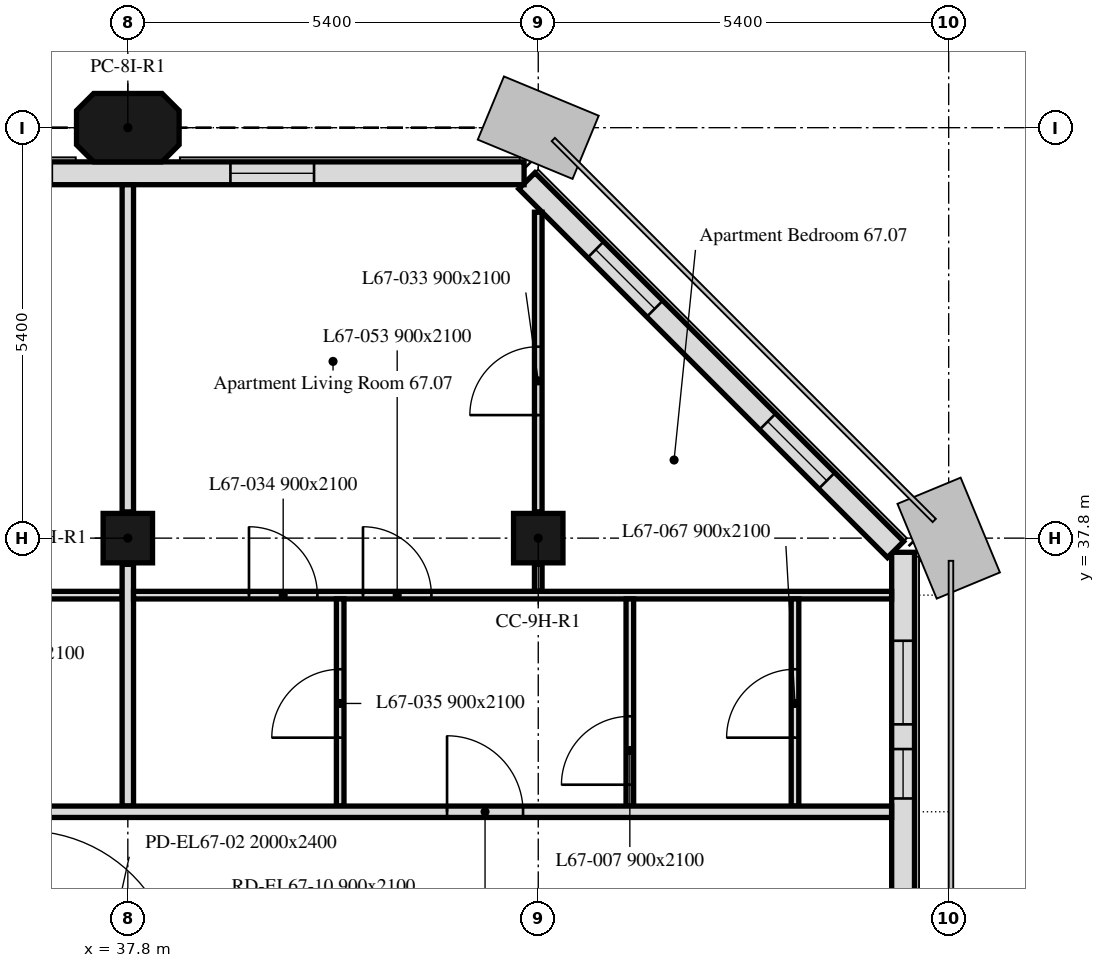
"""IFC4 building model, lengths in metres.
Left out: names, types, materials, properties, quantities, classifications, styles, units other than length and angle.
Written with IfcOpenShell. Run it as: python <this file> out.ifc"""

import sys

from ifc_helpers import new_model, si_unit, direction, frame, frame_2d, origin, origin_2d, place, context, subcontext, project, spatial, polyline, rectangle, outline, extrude, element, fill, save


model = new_model("IFC4")
c1 = context("Model", 3, precision=1e-05, world=origin(), true_north=direction((0.0, 1.0)))
c2 = subcontext(c1, "Body", "Model", "MODEL_VIEW")
j1 = project(units=[si_unit("LENGTHUNIT", "METRE"), si_unit("PLANEANGLEUNIT", "RADIAN")], contexts=[c1])
p1 = place(None, origin())
s1 = spatial("IfcSite", under=j1, at=p1, CompositionType="ELEMENT")
p2 = place(p1, origin())
s2 = spatial("IfcBuilding", under=s1, at=p2, CompositionType="ELEMENT")
p3 = place(p2, frame((0.0, 0.0, 275.2)))
s3 = spatial("IfcBuildingStorey", under=s2, at=p3, CompositionType="ELEMENT", Elevation=275.2)
for number, where, z_axis, x_axis in (
    (1, (37.8, 37.8, 0.0), (0.0, 0.0, 1.0), (1.0, 0.0, 0.0)),
    (2, (43.2, 37.8, 0.0), (0.0, 0.0, 1.0), (1.0, 0.0, 0.0)),
):
    element("IfcColumn", number, at=place(p3, frame(where, z_axis=z_axis, x_axis=x_axis)), inside=s3, PredefinedType="COLUMN", context=c2, shape_type="SweptSolid", body=[
        extrude(rectangle(XDim=0.65, YDim=0.65, at=origin_2d()), origin(), (0.0, 0.0, 1.0), 3.0),
    ])
p4 = place(p3, frame((37.8, 43.2, 0.0), z_axis=(0.0, 0.0, 1.0), x_axis=(1.0, 0.0, 0.0)))
e3 = element("IfcColumn", 3, at=p4, inside=s3, PredefinedType="COLUMN", context=c2, shape_type="SweptSolid", body=[
    extrude(outline(polyline([(-0.45, -0.45), (0.45, -0.45), (0.675, -0.225), (0.675, 0.225), (0.45, 0.45), (-0.45, 0.45), (-0.675, 0.225), (-0.675, -0.225), (-0.45, -0.45)])), origin(), (0.0, 0.0, 1.0), 3.0),
])
p5 = place(p3, frame((48.0, 5.586, 0.0), z_axis=(0.0, 0.0, 1.0), x_axis=(0.0, 1.0, 0.0)))
e4 = element("IfcWall", 4, at=p5, inside=s3, PredefinedType="SOLIDWALL", context=c2, shape_type="SweptSolid", body=[
    extrude(rectangle(XDim=32.027, YDim=0.3, at=frame_2d((16.014, 0.0))), origin(), (0.0, 0.0, 1.0), 3.0),
])
p6 = place(p5, frame((1.789, 0.0, 0.9)))
e5 = element("IfcOpeningElement", 5, at=p6, cuts=e4, PredefinedType="OPENING", context=c2, shape_type="SweptSolid", body=[
    extrude(rectangle(XDim=0.65, YDim=1.7, at=frame_2d((0.325, 0.85))), frame((0.0, 0.16, 0.0), z_axis=(0.0, -1.0, 0.0), x_axis=(1.0, 0.0, 0.0)), (0.0, 0.0, 1.0), 0.32),
])
p7 = place(p5, frame((2.764, 0.0, 0.9)))
e6 = element("IfcOpeningElement", 6, at=p7, cuts=e4, PredefinedType="OPENING", context=c2, shape_type="SweptSolid", body=[
    extrude(rectangle(XDim=1.1, YDim=1.7, at=frame_2d((0.55, 0.85))), frame((0.0, 0.16, 0.0), z_axis=(0.0, -1.0, 0.0), x_axis=(1.0, 0.0, 0.0)), (0.0, 0.0, 1.0), 0.32),
])
p8 = place(p5, frame((6.564, 0.0, 0.9)))
e7 = element("IfcOpeningElement", 7, at=p8, cuts=e4, PredefinedType="OPENING", context=c2, shape_type="SweptSolid", body=[
    extrude(rectangle(XDim=1.1, YDim=1.7, at=frame_2d((0.55, 0.85))), frame((0.0, 0.16, 0.0), z_axis=(0.0, -1.0, 0.0), x_axis=(1.0, 0.0, 0.0)), (0.0, 0.0, 1.0), 0.32),
])
p9 = place(p5, frame((7.989, 0.0, 0.9)))
e8 = element("IfcOpeningElement", 8, at=p9, cuts=e4, PredefinedType="OPENING", context=c2, shape_type="SweptSolid", body=[
    extrude(rectangle(XDim=0.65, YDim=1.7, at=frame_2d((0.325, 0.85))), frame((0.0, 0.16, 0.0), z_axis=(0.0, -1.0, 0.0), x_axis=(1.0, 0.0, 0.0)), (0.0, 0.0, 1.0), 0.32),
])
p10 = place(p5, frame((11.964, 0.0, 0.9)))
e9 = element("IfcOpeningElement", 9, at=p10, cuts=e4, PredefinedType="OPENING", context=c2, shape_type="SweptSolid", body=[
    extrude(rectangle(XDim=1.1, YDim=1.7, at=frame_2d((0.55, 0.85))), frame((0.0, 0.16, 0.0), z_axis=(0.0, -1.0, 0.0), x_axis=(1.0, 0.0, 0.0)), (0.0, 0.0, 1.0), 0.32),
])
p11 = place(p5, frame((13.564, 0.0, 0.9)))
e10 = element("IfcOpeningElement", 10, at=p11, cuts=e4, PredefinedType="OPENING", context=c2, shape_type="SweptSolid", body=[
    extrude(rectangle(XDim=1.1, YDim=1.7, at=frame_2d((0.55, 0.85))), frame((0.0, 0.16, 0.0), z_axis=(0.0, -1.0, 0.0), x_axis=(1.0, 0.0, 0.0)), (0.0, 0.0, 1.0), 0.32),
])
p12 = place(p5, frame((17.014, 0.0, 0.9)))
e11 = element("IfcOpeningElement", 11, at=p12, cuts=e4, PredefinedType="OPENING", context=c2, shape_type="SweptSolid", body=[
    extrude(rectangle(XDim=3.4, YDim=1.7, at=frame_2d((1.7, 0.85))), frame((0.0, 0.16, 0.0), z_axis=(0.0, -1.0, 0.0), x_axis=(1.0, 0.0, 0.0)), (0.0, 0.0, 1.0), 0.32),
])
p13 = place(p5, frame((22.764, 0.0, 0.9)))
e12 = element("IfcOpeningElement", 12, at=p13, cuts=e4, PredefinedType="OPENING", context=c2, shape_type="SweptSolid", body=[
    extrude(rectangle(XDim=1.1, YDim=1.7, at=frame_2d((0.55, 0.85))), frame((0.0, 0.16, 0.0), z_axis=(0.0, -1.0, 0.0), x_axis=(1.0, 0.0, 0.0)), (0.0, 0.0, 1.0), 0.32),
])
p14 = place(p5, frame((24.364, 0.0, 0.9)))
e13 = element("IfcOpeningElement", 13, at=p14, cuts=e4, PredefinedType="OPENING", context=c2, shape_type="SweptSolid", body=[
    extrude(rectangle(XDim=1.1, YDim=1.7, at=frame_2d((0.55, 0.85))), frame((0.0, 0.16, 0.0), z_axis=(0.0, -1.0, 0.0), x_axis=(1.0, 0.0, 0.0)), (0.0, 0.0, 1.0), 0.32),
])
p15 = place(p5, frame((28.789, 0.0, 0.9)))
e14 = element("IfcOpeningElement", 14, at=p15, cuts=e4, PredefinedType="OPENING", context=c2, shape_type="SweptSolid", body=[
    extrude(rectangle(XDim=0.65, YDim=1.7, at=frame_2d((0.325, 0.85))), frame((0.0, 0.16, 0.0), z_axis=(0.0, -1.0, 0.0), x_axis=(1.0, 0.0, 0.0)), (0.0, 0.0, 1.0), 0.32),
])
p16 = place(p5, frame((29.764, 0.0, 0.9)))
e15 = element("IfcOpeningElement", 15, at=p16, cuts=e4, PredefinedType="OPENING", context=c2, shape_type="SweptSolid", body=[
    extrude(rectangle(XDim=1.1, YDim=1.7, at=frame_2d((0.55, 0.85))), frame((0.0, 0.16, 0.0), z_axis=(0.0, -1.0, 0.0), x_axis=(1.0, 0.0, 0.0)), (0.0, 0.0, 1.0), 0.32),
])
p17 = place(p3, frame((47.901, 37.65, 0.0), z_axis=(0.0, 0.0, 1.0), x_axis=(-0.707106781187, 0.707106781187, 0.0)))
e16 = element("IfcWall", 16, at=p17, inside=s3, PredefinedType="SOLIDWALL", context=c2, shape_type="SweptSolid", body=[
    extrude(rectangle(XDim=6.86, YDim=0.3, at=frame_2d((3.43, 0.0))), origin(), (0.0, 0.0, 1.0), 3.0),
])
p18 = place(p17, frame((1.28, 0.0, 0.9)))
e17 = element("IfcOpeningElement", 17, at=p18, cuts=e16, PredefinedType="OPENING", context=c2, shape_type="SweptSolid", body=[
    extrude(rectangle(XDim=1.1, YDim=1.7, at=frame_2d((0.55, 0.85))), frame((0.0, 0.16, 0.0), z_axis=(0.0, -1.0, 0.0), x_axis=(1.0, 0.0, 0.0)), (0.0, 0.0, 1.0), 0.32),
])
p19 = place(p17, frame((4.48, 0.0, 0.9)))
e18 = element("IfcOpeningElement", 18, at=p19, cuts=e16, PredefinedType="OPENING", context=c2, shape_type="SweptSolid", body=[
    extrude(rectangle(XDim=1.1, YDim=1.7, at=frame_2d((0.55, 0.85))), frame((0.0, 0.16, 0.0), z_axis=(0.0, -1.0, 0.0), x_axis=(1.0, 0.0, 0.0)), (0.0, 0.0, 1.0), 0.32),
])
p20 = place(p3, frame((43.014, 42.6, 0.0), z_axis=(0.0, 0.0, 1.0), x_axis=(-1.0, 0.0, 0.0)))
e19 = element("IfcWall", 19, at=p20, inside=s3, PredefinedType="SOLIDWALL", context=c2, shape_type="SweptSolid", body=[
    extrude(rectangle(XDim=32.027, YDim=0.3, at=frame_2d((16.014, 0.0))), origin(), (0.0, 0.0, 1.0), 3.0),
])
p21 = place(p20, frame((2.764, 0.0, 0.9)))
e20 = element("IfcOpeningElement", 20, at=p21, cuts=e19, PredefinedType="OPENING", context=c2, shape_type="SweptSolid", body=[
    extrude(rectangle(XDim=1.1, YDim=1.7, at=frame_2d((0.55, 0.85))), frame((0.0, 0.16, 0.0), z_axis=(0.0, -1.0, 0.0), x_axis=(1.0, 0.0, 0.0)), (0.0, 0.0, 1.0), 0.32),
])
p22 = place(p20, frame((6.214, 0.0, 0.9)))
e21 = element("IfcOpeningElement", 21, at=p22, cuts=e19, PredefinedType="OPENING", context=c2, shape_type="SweptSolid", body=[
    extrude(rectangle(XDim=3.4, YDim=1.7, at=frame_2d((1.7, 0.85))), frame((0.0, 0.16, 0.0), z_axis=(0.0, -1.0, 0.0), x_axis=(1.0, 0.0, 0.0)), (0.0, 0.0, 1.0), 0.32),
])
p23 = place(p20, frame((13.564, 0.0, 0.9)))
e22 = element("IfcOpeningElement", 22, at=p23, cuts=e19, PredefinedType="OPENING", context=c2, shape_type="SweptSolid", body=[
    extrude(rectangle(XDim=1.1, YDim=1.7, at=frame_2d((0.55, 0.85))), frame((0.0, 0.16, 0.0), z_axis=(0.0, -1.0, 0.0), x_axis=(1.0, 0.0, 0.0)), (0.0, 0.0, 1.0), 0.32),
])
p24 = place(p20, frame((17.014, 0.0, 0.9)))
e23 = element("IfcOpeningElement", 23, at=p24, cuts=e19, PredefinedType="OPENING", context=c2, shape_type="SweptSolid", body=[
    extrude(rectangle(XDim=3.4, YDim=1.7, at=frame_2d((1.7, 0.85))), frame((0.0, 0.16, 0.0), z_axis=(0.0, -1.0, 0.0), x_axis=(1.0, 0.0, 0.0)), (0.0, 0.0, 1.0), 0.32),
])
p25 = place(p20, frame((24.364, 0.0, 0.9)))
e24 = element("IfcOpeningElement", 24, at=p25, cuts=e19, PredefinedType="OPENING", context=c2, shape_type="SweptSolid", body=[
    extrude(rectangle(XDim=1.1, YDim=1.7, at=frame_2d((0.55, 0.85))), frame((0.0, 0.16, 0.0), z_axis=(0.0, -1.0, 0.0), x_axis=(1.0, 0.0, 0.0)), (0.0, 0.0, 1.0), 0.32),
])
p26 = place(p20, frame((27.814, 0.0, 0.9)))
e25 = element("IfcOpeningElement", 25, at=p26, cuts=e19, PredefinedType="OPENING", context=c2, shape_type="SweptSolid", body=[
    extrude(rectangle(XDim=3.4, YDim=1.7, at=frame_2d((1.7, 0.85))), frame((0.0, 0.16, 0.0), z_axis=(0.0, -1.0, 0.0), x_axis=(1.0, 0.0, 0.0)), (0.0, 0.0, 1.0), 0.32),
])
p27 = place(p3, frame((27.075, 37.05, 0.0), z_axis=(0.0, 0.0, 1.0), x_axis=(1.0, 0.0, 0.0)))
e26 = element("IfcWall", 26, at=p27, inside=s3, PredefinedType="PARTITIONING", context=c2, shape_type="SweptSolid", body=[
    extrude(rectangle(XDim=10.65, YDim=0.1, at=frame_2d((5.325, 0.0))), origin(), (0.0, 0.0, 1.0), 3.0),
])
p28 = place(p27, frame((7.946, 0.0, 0.0)))
e27 = element("IfcOpeningElement", 27, at=p28, cuts=e26, PredefinedType="OPENING", context=c2, shape_type="SweptSolid", body=[
    extrude(rectangle(XDim=0.9, YDim=2.1, at=frame_2d((0.45, 1.05))), frame((0.0, 0.05, 0.0), z_axis=(0.0, -1.0, 0.0), x_axis=(1.0, 0.0, 0.0)), (0.0, 0.0, 1.0), 0.1),
])
p29 = place(p27, frame((1.46, 0.0, 0.0)))
e28 = element("IfcOpeningElement", 28, at=p29, cuts=e26, PredefinedType="OPENING", context=c2, shape_type="SweptSolid", body=[
    extrude(rectangle(XDim=0.9, YDim=2.1, at=frame_2d((0.45, 1.05))), frame((0.0, 0.05, 0.0), z_axis=(0.0, -1.0, 0.0), x_axis=(1.0, 0.0, 0.0)), (0.0, 0.0, 1.0), 0.1),
])
p30 = place(p27, frame((2.96, 0.0, 0.0)))
e29 = element("IfcOpeningElement", 29, at=p30, cuts=e26, PredefinedType="OPENING", context=c2, shape_type="SweptSolid", body=[
    extrude(rectangle(XDim=0.9, YDim=2.1, at=frame_2d((0.45, 1.05))), frame((0.0, 0.05, 0.0), z_axis=(0.0, -1.0, 0.0), x_axis=(1.0, 0.0, 0.0)), (0.0, 0.0, 1.0), 0.1),
])
p31 = place(p3, frame((37.8, 38.145, 0.0), z_axis=(0.0, 0.0, 1.0), x_axis=(0.0, 1.0, 0.0)))
e30 = element("IfcWall", 30, at=p31, inside=s3, PredefinedType="PARTITIONING", context=c2, shape_type="SweptSolid", body=[
    extrude(rectangle(XDim=4.304, YDim=0.15, at=frame_2d((2.152, 0.0))), origin(), (0.0, 0.0, 1.0), 3.0),
])
p32 = place(p3, frame((37.8, 34.275, 0.0), z_axis=(0.0, 0.0, 1.0), x_axis=(0.0, 1.0, 0.0)))
e31 = element("IfcWall", 31, at=p32, inside=s3, PredefinedType="PARTITIONING", context=c2, shape_type="SweptSolid", body=[
    extrude(rectangle(XDim=3.18, YDim=0.15, at=frame_2d((1.59, 0.0))), origin(), (0.0, 0.0, 1.0), 3.0),
])
p33 = place(p3, frame((43.2, 37.1, 0.0), z_axis=(0.0, 0.0, 1.0), x_axis=(0.0, 1.0, 0.0)))
e32 = element("IfcWall", 32, at=p33, inside=s3, PredefinedType="PARTITIONING", context=c2, shape_type="SweptSolid", body=[
    extrude(rectangle(XDim=0.355, YDim=0.1, at=frame_2d((0.177, 0.0))), origin(), (0.0, 0.0, 1.0), 3.0),
])
p34 = place(p3, frame((43.2, 38.145, 0.0), z_axis=(0.0, 0.0, 1.0), x_axis=(0.0, 1.0, 0.0)))
e33 = element("IfcWall", 33, at=p34, inside=s3, PredefinedType="PARTITIONING", context=c2, shape_type="SweptSolid", body=[
    extrude(rectangle(XDim=3.943, YDim=0.1, at=frame_2d((1.971, 0.0))), origin(), (0.0, 0.0, 1.0), 3.0),
])
p35 = place(p34, frame((1.274, 0.0, 0.0)))
e34 = element("IfcOpeningElement", 34, at=p35, cuts=e33, PredefinedType="OPENING", context=c2, shape_type="SweptSolid", body=[
    extrude(rectangle(XDim=0.9, YDim=2.1, at=frame_2d((0.45, 1.05))), frame((0.0, 0.05, 0.0), z_axis=(0.0, -1.0, 0.0), x_axis=(1.0, 0.0, 0.0)), (0.0, 0.0, 1.0), 0.1),
])
p36 = place(p3, frame((37.875, 37.05, 0.0), z_axis=(0.0, 0.0, 1.0), x_axis=(1.0, 0.0, 0.0)))
e35 = element("IfcWall", 35, at=p36, inside=s3, PredefinedType="PARTITIONING", context=c2, shape_type="SweptSolid", body=[
    extrude(rectangle(XDim=9.974, YDim=0.1, at=frame_2d((4.987, 0.0))), origin(), (0.0, 0.0, 1.0), 3.0),
])
p37 = place(p36, frame((1.519, 0.0, 0.0)))
e36 = element("IfcOpeningElement", 36, at=p37, cuts=e35, PredefinedType="OPENING", context=c2, shape_type="SweptSolid", body=[
    extrude(rectangle(XDim=0.9, YDim=2.1, at=frame_2d((0.45, 1.05))), frame((0.0, 0.05, 0.0), z_axis=(0.0, -1.0, 0.0), x_axis=(1.0, 0.0, 0.0)), (0.0, 0.0, 1.0), 0.1),
])
p38 = place(p36, frame((3.019, 0.0, 0.0)))
e37 = element("IfcOpeningElement", 37, at=p38, cuts=e35, PredefinedType="OPENING", context=c2, shape_type="SweptSolid", body=[
    extrude(rectangle(XDim=0.9, YDim=2.1, at=frame_2d((0.45, 1.05))), frame((0.0, 0.05, 0.0), z_axis=(0.0, -1.0, 0.0), x_axis=(1.0, 0.0, 0.0)), (0.0, 0.0, 1.0), 0.1),
])
p39 = place(p3, frame((40.594, 34.275, 0.0), z_axis=(0.0, 0.0, 1.0), x_axis=(0.0, 1.0, 0.0)))
e38 = element("IfcWall", 38, at=p39, inside=s3, PredefinedType="PARTITIONING", context=c2, shape_type="SweptSolid", body=[
    extrude(rectangle(XDim=2.725, YDim=0.1, at=frame_2d((1.363, 0.0))), origin(), (0.0, 0.0, 1.0), 3.0),
])
p40 = place(p39, frame((0.9, 0.0, 0.0)))
e39 = element("IfcOpeningElement", 39, at=p40, cuts=e38, PredefinedType="OPENING", context=c2, shape_type="SweptSolid", body=[
    extrude(rectangle(XDim=0.9, YDim=2.1, at=frame_2d((0.45, 1.05))), frame((0.0, 0.05, 0.0), z_axis=(0.0, -1.0, 0.0), x_axis=(1.0, 0.0, 0.0)), (0.0, 0.0, 1.0), 0.1),
])
p41 = place(p3, frame((44.405, 34.275, 0.0), z_axis=(0.0, 0.0, 1.0), x_axis=(0.0, 1.0, 0.0)))
e40 = element("IfcWall", 40, at=p41, inside=s3, PredefinedType="PARTITIONING", context=c2, shape_type="SweptSolid", body=[
    extrude(rectangle(XDim=2.725, YDim=0.1, at=frame_2d((1.363, 0.0))), origin(), (0.0, 0.0, 1.0), 3.0),
])
p42 = place(p41, frame((0.281, 0.0, 0.0)))
e41 = element("IfcOpeningElement", 41, at=p42, cuts=e40, PredefinedType="OPENING", context=c2, shape_type="SweptSolid", body=[
    extrude(rectangle(XDim=0.9, YDim=2.1, at=frame_2d((0.45, 1.05))), frame((0.0, 0.05, 0.0), z_axis=(0.0, -1.0, 0.0), x_axis=(1.0, 0.0, 0.0)), (0.0, 0.0, 1.0), 0.1),
])
p43 = place(p3, frame((46.578, 34.275, 0.0), z_axis=(0.0, 0.0, 1.0), x_axis=(0.0, 1.0, 0.0)))
e42 = element("IfcWall", 42, at=p43, inside=s3, PredefinedType="PARTITIONING", context=c2, shape_type="SweptSolid", body=[
    extrude(rectangle(XDim=2.725, YDim=0.1, at=frame_2d((1.363, 0.0))), origin(), (0.0, 0.0, 1.0), 3.0),
])
p44 = place(p43, frame((0.9, 0.0, 0.0)))
e43 = element("IfcOpeningElement", 43, at=p44, cuts=e42, PredefinedType="OPENING", context=c2, shape_type="SweptSolid", body=[
    extrude(rectangle(XDim=0.9, YDim=2.1, at=frame_2d((0.45, 1.05))), frame((0.0, 0.05, 0.0), z_axis=(0.0, -1.0, 0.0), x_axis=(1.0, 0.0, 0.0)), (0.0, 0.0, 1.0), 0.1),
])
p45 = place(p3, frame((6.151, 34.2, 0.0), z_axis=(0.0, 0.0, 1.0), x_axis=(1.0, 0.0, 0.0)))
e44 = element("IfcWall", 44, at=p45, inside=s3, PredefinedType="PARTITIONING", context=c2, shape_type="SweptSolid", body=[
    extrude(rectangle(XDim=41.698, YDim=0.15, at=frame_2d((20.849, 0.0))), origin(), (0.0, 0.0, 1.0), 3.0),
])
p46 = place(p45, frame((3.369, 0.0, 0.0)))
e45 = element("IfcOpeningElement", 45, at=p46, cuts=e44, PredefinedType="OPENING", context=c2, shape_type="SweptSolid", body=[
    extrude(rectangle(XDim=1.0, YDim=2.1, at=frame_2d((0.5, 1.05))), frame((0.0, 0.075, 0.0), z_axis=(0.0, -1.0, 0.0), x_axis=(1.0, 0.0, 0.0)), (0.0, 0.0, 1.0), 0.15),
])
p47 = place(p45, frame((12.483, 0.0, 0.0)))
e46 = element("IfcOpeningElement", 46, at=p47, cuts=e44, PredefinedType="OPENING", context=c2, shape_type="SweptSolid", body=[
    extrude(rectangle(XDim=1.0, YDim=2.1, at=frame_2d((0.5, 1.05))), frame((0.0, 0.075, 0.0), z_axis=(0.0, -1.0, 0.0), x_axis=(1.0, 0.0, 0.0)), (0.0, 0.0, 1.0), 0.15),
])
p48 = place(p45, frame((24.572, 0.0, 0.0)))
e47 = element("IfcOpeningElement", 47, at=p48, cuts=e44, PredefinedType="OPENING", context=c2, shape_type="SweptSolid", body=[
    extrude(rectangle(XDim=1.0, YDim=2.1, at=frame_2d((0.5, 1.05))), frame((0.0, 0.075, 0.0), z_axis=(0.0, -1.0, 0.0), x_axis=(1.0, 0.0, 0.0)), (0.0, 0.0, 1.0), 0.15),
])
p49 = place(p45, frame((35.849, 0.0, 0.0)))
e48 = element("IfcOpeningElement", 48, at=p49, cuts=e44, PredefinedType="OPENING", context=c2, shape_type="SweptSolid", body=[
    extrude(rectangle(XDim=1.0, YDim=2.1, at=frame_2d((0.5, 1.05))), frame((0.0, 0.075, 0.0), z_axis=(0.0, -1.0, 0.0), x_axis=(1.0, 0.0, 0.0)), (0.0, 0.0, 1.0), 0.15),
])
p50 = place(p15, origin())
e49 = element("IfcWindow", 49, at=p50, inside=s3, PartitioningType="SINGLE_PANEL", PredefinedType="WINDOW", context=c2, shape_type="SweptSolid", body=[
    extrude(rectangle(XDim=0.65, YDim=1.7, at=frame_2d((0.325, 0.85))), frame((0.0, 0.03, 0.0), z_axis=(0.0, -1.0, 0.0), x_axis=(1.0, 0.0, 0.0)), (0.0, 0.0, 1.0), 0.06),
])
fill(e14, e49)
p51 = place(p16, origin())
e50 = element("IfcWindow", 50, at=p51, inside=s3, PartitioningType="SINGLE_PANEL", PredefinedType="WINDOW", context=c2, shape_type="SweptSolid", body=[
    extrude(rectangle(XDim=1.1, YDim=1.7, at=frame_2d((0.55, 0.85))), frame((0.0, 0.03, 0.0), z_axis=(0.0, -1.0, 0.0), x_axis=(1.0, 0.0, 0.0)), (0.0, 0.0, 1.0), 0.06),
])
fill(e15, e50)
p52 = place(p18, origin())
e51 = element("IfcWindow", 51, at=p52, inside=s3, PartitioningType="SINGLE_PANEL", PredefinedType="WINDOW", context=c2, shape_type="SweptSolid", body=[
    extrude(rectangle(XDim=1.1, YDim=1.7, at=frame_2d((0.55, 0.85))), frame((0.0, 0.03, 0.0), z_axis=(0.0, -1.0, 0.0), x_axis=(1.0, 0.0, 0.0)), (0.0, 0.0, 1.0), 0.06),
])
fill(e17, e51)
p53 = place(p19, origin())
e52 = element("IfcWindow", 52, at=p53, inside=s3, PartitioningType="SINGLE_PANEL", PredefinedType="WINDOW", context=c2, shape_type="SweptSolid", body=[
    extrude(rectangle(XDim=1.1, YDim=1.7, at=frame_2d((0.55, 0.85))), frame((0.0, 0.03, 0.0), z_axis=(0.0, -1.0, 0.0), x_axis=(1.0, 0.0, 0.0)), (0.0, 0.0, 1.0), 0.06),
])
fill(e18, e52)
p54 = place(p21, origin())
e53 = element("IfcWindow", 53, at=p54, inside=s3, PartitioningType="SINGLE_PANEL", PredefinedType="WINDOW", context=c2, shape_type="SweptSolid", body=[
    extrude(rectangle(XDim=1.1, YDim=1.7, at=frame_2d((0.55, 0.85))), frame((0.0, 0.03, 0.0), z_axis=(0.0, -1.0, 0.0), x_axis=(1.0, 0.0, 0.0)), (0.0, 0.0, 1.0), 0.06),
])
fill(e20, e53)
p55 = place(p42, origin())
e54 = element("IfcDoor", 54, at=p55, inside=s3, OperationType="SINGLE_SWING_RIGHT", PredefinedType="DOOR", context=c2, shape_type="SweptSolid", body=[
    extrude(rectangle(XDim=0.9, YDim=2.1, at=frame_2d((0.45, 1.05))), frame((0.0, 0.025, 0.0), z_axis=(0.0, -1.0, 0.0), x_axis=(1.0, 0.0, 0.0)), (0.0, 0.0, 1.0), 0.05),
])
fill(e41, e54)
p56 = place(p35, origin())
e55 = element("IfcDoor", 55, at=p56, inside=s3, OperationType="SINGLE_SWING_LEFT", PredefinedType="DOOR", context=c2, shape_type="SweptSolid", body=[
    extrude(rectangle(XDim=0.9, YDim=2.1, at=frame_2d((0.45, 1.05))), frame((0.0, 0.025, 0.0), z_axis=(0.0, -1.0, 0.0), x_axis=(1.0, 0.0, 0.0)), (0.0, 0.0, 1.0), 0.05),
])
fill(e34, e55)
p57 = place(p37, origin())
e56 = element("IfcDoor", 56, at=p57, inside=s3, OperationType="SINGLE_SWING_RIGHT", PredefinedType="DOOR", context=c2, shape_type="SweptSolid", body=[
    extrude(rectangle(XDim=0.9, YDim=2.1, at=frame_2d((0.45, 1.05))), frame((0.0, 0.025, 0.0), z_axis=(0.0, -1.0, 0.0), x_axis=(1.0, 0.0, 0.0)), (0.0, 0.0, 1.0), 0.05),
])
fill(e36, e56)
p58 = place(p40, origin())
e57 = element("IfcDoor", 57, at=p58, inside=s3, OperationType="SINGLE_SWING_RIGHT", PredefinedType="DOOR", context=c2, shape_type="SweptSolid", body=[
    extrude(rectangle(XDim=0.9, YDim=2.1, at=frame_2d((0.45, 1.05))), frame((0.0, 0.025, 0.0), z_axis=(0.0, -1.0, 0.0), x_axis=(1.0, 0.0, 0.0)), (0.0, 0.0, 1.0), 0.05),
])
fill(e39, e57)
p59 = place(p38, origin())
e58 = element("IfcDoor", 58, at=p59, inside=s3, OperationType="SINGLE_SWING_LEFT", PredefinedType="DOOR", context=c2, shape_type="SweptSolid", body=[
    extrude(rectangle(XDim=0.9, YDim=2.1, at=frame_2d((0.45, 1.05))), frame((0.0, 0.025, 0.0), z_axis=(0.0, -1.0, 0.0), x_axis=(1.0, 0.0, 0.0)), (0.0, 0.0, 1.0), 0.05),
])
fill(e37, e58)
p60 = place(p49, origin())
e59 = element("IfcDoor", 59, at=p60, inside=s3, OperationType="SINGLE_SWING_LEFT", PredefinedType="DOOR", context=c2, shape_type="SweptSolid", body=[
    extrude(rectangle(XDim=1.0, YDim=2.1, at=frame_2d((0.5, 1.05))), frame((0.0, 0.025, 0.0), z_axis=(0.0, -1.0, 0.0), x_axis=(1.0, 0.0, 0.0)), (0.0, 0.0, 1.0), 0.05),
])
fill(e48, e59)
p61 = place(p44, origin())
e60 = element("IfcDoor", 60, at=p61, inside=s3, OperationType="SINGLE_SWING_LEFT", PredefinedType="DOOR", context=c2, shape_type="SweptSolid", body=[
    extrude(rectangle(XDim=0.9, YDim=2.1, at=frame_2d((0.45, 1.05))), frame((0.0, 0.025, 0.0), z_axis=(0.0, -1.0, 0.0), x_axis=(1.0, 0.0, 0.0)), (0.0, 0.0, 1.0), 0.05),
])
fill(e43, e60)
save(model, sys.argv[1])
